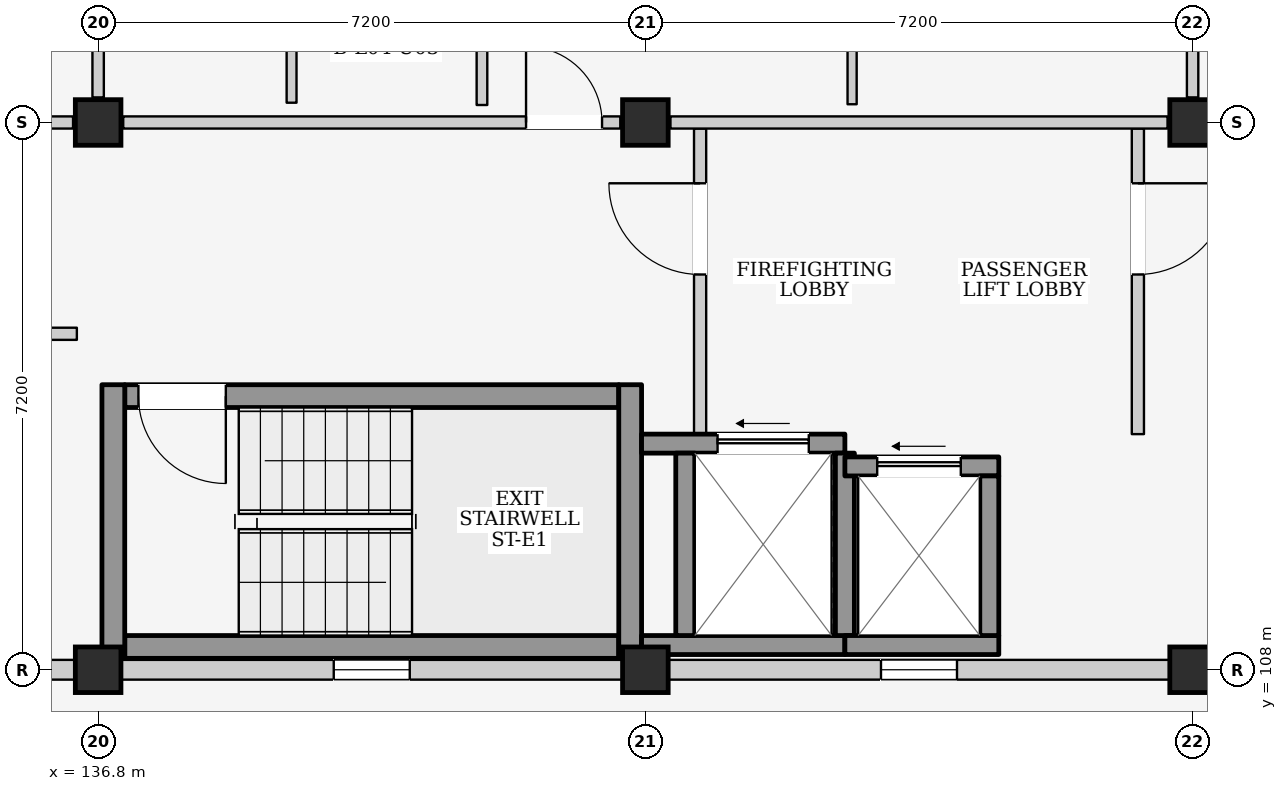
"""IFC4 building model, lengths in metres.
Left out: names, types, materials, properties, quantities, classifications, styles, units other than length and angle.
Written with IfcOpenShell. Run it as: python <this file> out.ifc"""

import sys

from ifc_helpers import new_model, si_unit, direction, frame, frame_2d, origin, origin_2d, place, context, subcontext, project, spatial, rectangle, extrude, element, fill, save


model = new_model("IFC4")
c1 = context("Model", 3, precision=1e-05, world=origin(), true_north=direction((0.0, 1.0)))
c2 = subcontext(c1, "Body", "Model", "MODEL_VIEW")
j1 = project(units=[si_unit("LENGTHUNIT", "METRE"), si_unit("PLANEANGLEUNIT", "RADIAN")], contexts=[c1])
p1 = place(None, origin())
s1 = spatial("IfcSite", under=j1, at=p1, CompositionType="ELEMENT")
p2 = place(p1, origin())
s2 = spatial("IfcBuilding", under=s1, at=p2, CompositionType="ELEMENT")
p3 = place(p2, frame((0.0, 0.0, 15.4)))
s3 = spatial("IfcBuildingStorey", under=s2, at=p3, CompositionType="ELEMENT", Elevation=15.4)
for number, where, z_axis, x_axis in (
    (1, (136.8, 108.0, 0.0), (0.0, 0.0, 1.0), (1.0, 0.0, 0.0)),
    (2, (136.8, 115.2, 0.0), (0.0, 0.0, 1.0), (1.0, 0.0, 0.0)),
    (3, (144.0, 108.0, 0.0), (0.0, 0.0, 1.0), (1.0, 0.0, 0.0)),
    (4, (144.0, 115.2, 0.0), (0.0, 0.0, 1.0), (1.0, 0.0, 0.0)),
    (5, (151.2, 108.0, 0.0), (0.0, 0.0, 1.0), (1.0, 0.0, 0.0)),
    (6, (151.2, 115.2, 0.0), (0.0, 0.0, 1.0), (1.0, 0.0, 0.0)),
):
    element("IfcColumn", number, at=place(p3, frame(where, z_axis=z_axis, x_axis=x_axis)), inside=s3, PredefinedType="COLUMN", context=c2, shape_type="SweptSolid", body=[
        extrude(rectangle(XDim=0.6, YDim=0.6, at=origin_2d()), origin(), (0.0, 0.0, 1.0), 3.2),
    ])
p4 = place(p3, frame((129.9, 108.0, 0.0), z_axis=(0.0, 0.0, 1.0), x_axis=(1.0, 0.0, 0.0)))
e7 = element("IfcWall", 7, at=p4, inside=s3, PredefinedType="ELEMENTEDWALL", context=c2, shape_type="SweptSolid", body=[
    extrude(rectangle(XDim=6.6, YDim=0.26, at=frame_2d((3.3, 0.0))), origin(), (0.0, 0.0, 1.0), 2.335),
])
p5 = place(p4, frame((1.1, 0.0, 0.0)))
e8 = element("IfcOpeningElement", 8, at=p5, cuts=e7, PredefinedType="OPENING", context=c2, shape_type="SweptSolid", body=[
    extrude(rectangle(XDim=1.5, YDim=2.12, at=frame_2d((0.75, 1.06))), frame((0.0, 0.145, 0.0), z_axis=(0.0, -1.0, 0.0), x_axis=(1.0, 0.0, 0.0)), (0.0, 0.0, 1.0), 0.29),
])
p6 = place(p4, frame((3.6, 0.0, 0.725)))
e9 = element("IfcOpeningElement", 9, at=p6, cuts=e7, PredefinedType="OPENING", context=c2, shape_type="SweptSolid", body=[
    extrude(rectangle(XDim=1.35, YDim=1.5, at=frame_2d((0.675, 0.75))), frame((0.0, 0.145, 0.0), z_axis=(0.0, -1.0, 0.0), x_axis=(1.0, 0.0, 0.0)), (0.0, 0.0, 1.0), 0.29),
])
p7 = place(p3, frame((137.1, 108.0, 0.0), z_axis=(0.0, 0.0, 1.0), x_axis=(1.0, 0.0, 0.0)))
e10 = element("IfcWall", 10, at=p7, inside=s3, PredefinedType="ELEMENTEDWALL", context=c2, shape_type="SweptSolid", body=[
    extrude(rectangle(XDim=6.6, YDim=0.26, at=frame_2d((3.3, 0.0))), origin(), (0.0, 0.0, 1.0), 2.335),
])
p8 = place(p7, frame((2.8, 0.0, 1.2)))
e11 = element("IfcOpeningElement", 11, at=p8, cuts=e10, PredefinedType="OPENING", context=c2, shape_type="SweptSolid", body=[
    extrude(rectangle(XDim=1.0, YDim=0.9, at=frame_2d((0.5, 0.45))), frame((0.0, 0.145, 0.0), z_axis=(0.0, -1.0, 0.0), x_axis=(1.0, 0.0, 0.0)), (0.0, 0.0, 1.0), 0.29),
])
p9 = place(p3, frame((144.3, 108.0, 0.0), z_axis=(0.0, 0.0, 1.0), x_axis=(1.0, 0.0, 0.0)))
e12 = element("IfcWall", 12, at=p9, inside=s3, PredefinedType="ELEMENTEDWALL", context=c2, shape_type="SweptSolid", body=[
    extrude(rectangle(XDim=6.6, YDim=0.26, at=frame_2d((3.3, 0.0))), origin(), (0.0, 0.0, 1.0), 2.335),
])
p10 = place(p9, frame((2.8, 0.0, 1.2)))
e13 = element("IfcOpeningElement", 13, at=p10, cuts=e12, PredefinedType="OPENING", context=c2, shape_type="SweptSolid", body=[
    extrude(rectangle(XDim=1.0, YDim=0.9, at=frame_2d((0.5, 0.45))), frame((0.0, 0.145, 0.0), z_axis=(0.0, -1.0, 0.0), x_axis=(1.0, 0.0, 0.0)), (0.0, 0.0, 1.0), 0.29),
])
p11 = place(p3, frame((137.15, 108.3, 0.0), z_axis=(0.0, 0.0, 1.0), x_axis=(1.0, 0.0, 0.0)))
e14 = element("IfcWall", 14, at=p11, inside=s3, PredefinedType="SHEAR", context=c2, shape_type="SweptSolid", body=[
    extrude(rectangle(XDim=6.5, YDim=0.3, at=frame_2d((3.25, 0.0))), origin(), (0.0, 0.0, 1.0), 2.95),
])
p12 = place(p3, frame((137.15, 111.6, 0.0), z_axis=(0.0, 0.0, 1.0), x_axis=(1.0, 0.0, 0.0)))
e15 = element("IfcWall", 15, at=p12, inside=s3, PredefinedType="SHEAR", context=c2, shape_type="SweptSolid", body=[
    extrude(rectangle(XDim=6.5, YDim=0.3, at=frame_2d((3.25, 0.0))), origin(), (0.0, 0.0, 1.0), 2.95),
])
p13 = place(p12, frame((0.18, 0.0, 0.0)))
e16 = element("IfcOpeningElement", 16, at=p13, cuts=e15, PredefinedType="OPENING", context=c2, shape_type="SweptSolid", body=[
    extrude(rectangle(XDim=1.15, YDim=2.2, at=frame_2d((0.575, 1.1))), frame((0.0, 0.165, 0.0), z_axis=(0.0, -1.0, 0.0), x_axis=(1.0, 0.0, 0.0)), (0.0, 0.0, 1.0), 0.33),
])
for number, where, z_axis, x_axis in (
    (17, (137.0, 108.15, 0.0), (0.0, 0.0, 1.0), (0.0, 1.0, 0.0)),
    (18, (143.8, 108.15, 0.0), (0.0, 0.0, 1.0), (0.0, 1.0, 0.0)),
):
    element("IfcWall", number, at=place(p3, frame(where, z_axis=z_axis, x_axis=x_axis)), inside=s3, PredefinedType="SHEAR", context=c2, shape_type="SweptSolid", body=[
        extrude(rectangle(XDim=3.6, YDim=0.3, at=frame_2d((1.8, 0.0))), origin(), (0.0, 0.0, 1.0), 2.95),
    ])
p14 = place(p3, frame((144.72, 111.1, 0.0), z_axis=(0.0, 0.0, 1.0), x_axis=(0.0, 1.0, 0.0)))
e19 = element("IfcWall", 19, at=p14, inside=s3, PredefinedType="PARTITIONING", context=c2, shape_type="SweptSolid", body=[
    extrude(rectangle(XDim=4.02, YDim=0.16, at=frame_2d((2.01, 0.0))), origin(), (0.0, 0.0, 1.0), 2.95),
])
p15 = place(p14, frame((2.1, 0.0, 0.0)))
e20 = element("IfcOpeningElement", 20, at=p15, cuts=e19, PredefinedType="OPENING", context=c2, shape_type="SweptSolid", body=[
    extrude(rectangle(XDim=1.2, YDim=2.2, at=frame_2d((0.6, 1.1))), frame((0.0, 0.095, 0.0), z_axis=(0.0, -1.0, 0.0), x_axis=(1.0, 0.0, 0.0)), (0.0, 0.0, 1.0), 0.19),
])
p16 = place(p3, frame((150.48, 111.1, 0.0), z_axis=(0.0, 0.0, 1.0), x_axis=(0.0, 1.0, 0.0)))
e21 = element("IfcWall", 21, at=p16, inside=s3, PredefinedType="PARTITIONING", context=c2, shape_type="SweptSolid", body=[
    extrude(rectangle(XDim=4.02, YDim=0.16, at=frame_2d((2.01, 0.0))), origin(), (0.0, 0.0, 1.0), 2.95),
])
p17 = place(p16, frame((2.1, 0.0, 0.0)))
e22 = element("IfcOpeningElement", 22, at=p17, cuts=e21, PredefinedType="OPENING", context=c2, shape_type="SweptSolid", body=[
    extrude(rectangle(XDim=1.2, YDim=2.2, at=frame_2d((0.6, 1.1))), frame((0.0, 0.095, 0.0), z_axis=(0.0, -1.0, 0.0), x_axis=(1.0, 0.0, 0.0)), (0.0, 0.0, 1.0), 0.19),
])
p18 = place(p3, frame((143.95, 108.325, 0.0), z_axis=(0.0, 0.0, 1.0), x_axis=(1.0, 0.0, 0.0)))
e23 = element("IfcWall", 23, at=p18, inside=s3, PredefinedType="SHEAR", context=c2, shape_type="SweptSolid", body=[
    extrude(rectangle(XDim=2.675, YDim=0.25, at=frame_2d((1.337, 0.0))), origin(), (0.0, 0.0, 1.0), 2.95),
])
p19 = place(p3, frame((143.95, 110.975, 0.0), z_axis=(0.0, 0.0, 1.0), x_axis=(1.0, 0.0, 0.0)))
e24 = element("IfcWall", 24, at=p19, inside=s3, PredefinedType="SHEAR", context=c2, shape_type="SweptSolid", body=[
    extrude(rectangle(XDim=2.675, YDim=0.25, at=frame_2d((1.337, 0.0))), origin(), (0.0, 0.0, 1.0), 2.95),
])
p20 = place(p19, frame((1.0, 0.0, 0.0)))
e25 = element("IfcOpeningElement", 25, at=p20, cuts=e24, PredefinedType="OPENING", context=c2, shape_type="SweptSolid", body=[
    extrude(rectangle(XDim=1.2, YDim=2.25, at=frame_2d((0.6, 1.125))), frame((0.0, 0.14, 0.0), z_axis=(0.0, -1.0, 0.0), x_axis=(1.0, 0.0, 0.0)), (0.0, 0.0, 1.0), 0.28),
])
for number, where, z_axis, x_axis in (
    (26, (144.525, 108.45, 0.0), (0.0, 0.0, 1.0), (0.0, 1.0, 0.0)),
    (27, (146.625, 108.45, 0.0), (0.0, 0.0, 1.0), (0.0, 1.0, 0.0)),
):
    element("IfcWall", number, at=place(p3, frame(where, z_axis=z_axis, x_axis=x_axis)), inside=s3, PredefinedType="SHEAR", context=c2, shape_type="SweptSolid", body=[
        extrude(rectangle(XDim=2.4, YDim=0.25, at=frame_2d((1.2, 0.0))), origin(), (0.0, 0.0, 1.0), 2.95),
    ])
p21 = place(p3, frame((146.625, 108.325, 0.0), z_axis=(0.0, 0.0, 1.0), x_axis=(1.0, 0.0, 0.0)))
e28 = element("IfcWall", 28, at=p21, inside=s3, PredefinedType="SHEAR", context=c2, shape_type="SweptSolid", body=[
    extrude(rectangle(XDim=2.025, YDim=0.25, at=frame_2d((1.012, 0.0))), origin(), (0.0, 0.0, 1.0), 2.95),
])
p22 = place(p3, frame((146.625, 110.675, 0.0), z_axis=(0.0, 0.0, 1.0), x_axis=(1.0, 0.0, 0.0)))
e29 = element("IfcWall", 29, at=p22, inside=s3, PredefinedType="SHEAR", context=c2, shape_type="SweptSolid", body=[
    extrude(rectangle(XDim=2.025, YDim=0.25, at=frame_2d((1.012, 0.0))), origin(), (0.0, 0.0, 1.0), 2.95),
])
p23 = place(p22, frame((0.425, 0.0, 0.0)))
e30 = element("IfcOpeningElement", 30, at=p23, cuts=e29, PredefinedType="OPENING", context=c2, shape_type="SweptSolid", body=[
    extrude(rectangle(XDim=1.1, YDim=2.15, at=frame_2d((0.55, 1.075))), frame((0.0, 0.14, 0.0), z_axis=(0.0, -1.0, 0.0), x_axis=(1.0, 0.0, 0.0)), (0.0, 0.0, 1.0), 0.28),
])
p24 = place(p3, frame((148.525, 108.45, 0.0), z_axis=(0.0, 0.0, 1.0), x_axis=(0.0, 1.0, 0.0)))
e31 = element("IfcWall", 31, at=p24, inside=s3, PredefinedType="SHEAR", context=c2, shape_type="SweptSolid", body=[
    extrude(rectangle(XDim=2.1, YDim=0.25, at=frame_2d((1.05, 0.0))), origin(), (0.0, 0.0, 1.0), 2.95),
])
p25 = place(p3, frame((129.93, 115.2, 0.0), z_axis=(0.0, 0.0, 1.0), x_axis=(1.0, 0.0, 0.0)))
e32 = element("IfcWall", 32, at=p25, inside=s3, PredefinedType="PARTITIONING", context=c2, shape_type="SweptSolid", body=[
    extrude(rectangle(XDim=6.54, YDim=0.16, at=frame_2d((3.27, 0.0))), origin(), (0.0, 0.0, 1.0), 2.335),
])
p26 = place(p25, frame((4.12, 0.0, 0.0)))
e33 = element("IfcOpeningElement", 33, at=p26, cuts=e32, PredefinedType="OPENING", context=c2, shape_type="SweptSolid", body=[
    extrude(rectangle(XDim=1.0, YDim=2.15, at=frame_2d((0.5, 1.075))), frame((0.0, 0.095, 0.0), z_axis=(0.0, -1.0, 0.0), x_axis=(1.0, 0.0, 0.0)), (0.0, 0.0, 1.0), 0.19),
])
p27 = place(p3, frame((136.8, 115.53, 0.0), z_axis=(0.0, 0.0, 1.0), x_axis=(0.0, 1.0, 0.0)))
e34 = element("IfcWall", 34, at=p27, inside=s3, PredefinedType="PARTITIONING", context=c2, shape_type="SweptSolid", body=[
    extrude(rectangle(XDim=6.54, YDim=0.15, at=frame_2d((3.27, 0.0))), origin(), (0.0, 0.0, 1.0), 2.385),
])
p28 = place(p3, frame((137.13, 115.2, 0.0), z_axis=(0.0, 0.0, 1.0), x_axis=(1.0, 0.0, 0.0)))
e35 = element("IfcWall", 35, at=p28, inside=s3, PredefinedType="PARTITIONING", context=c2, shape_type="SweptSolid", body=[
    extrude(rectangle(XDim=6.54, YDim=0.16, at=frame_2d((3.27, 0.0))), origin(), (0.0, 0.0, 1.0), 2.335),
])
p29 = place(p28, frame((5.3, 0.0, 0.0)))
e36 = element("IfcOpeningElement", 36, at=p29, cuts=e35, PredefinedType="OPENING", context=c2, shape_type="SweptSolid", body=[
    extrude(rectangle(XDim=1.0, YDim=2.15, at=frame_2d((0.5, 1.075))), frame((0.0, 0.095, 0.0), z_axis=(0.0, -1.0, 0.0), x_axis=(1.0, 0.0, 0.0)), (0.0, 0.0, 1.0), 0.19),
])
p30 = place(p3, frame((144.33, 115.2, 0.0), z_axis=(0.0, 0.0, 1.0), x_axis=(1.0, 0.0, 0.0)))
e37 = element("IfcWall", 37, at=p30, inside=s3, PredefinedType="PARTITIONING", context=c2, shape_type="SweptSolid", body=[
    extrude(rectangle(XDim=6.54, YDim=0.16, at=frame_2d((3.27, 0.0))), origin(), (0.0, 0.0, 1.0), 2.335),
])
p31 = place(p3, frame((151.2, 115.53, 0.0), z_axis=(0.0, 0.0, 1.0), x_axis=(0.0, 1.0, 0.0)))
e38 = element("IfcWall", 38, at=p31, inside=s3, PredefinedType="PARTITIONING", context=c2, shape_type="SweptSolid", body=[
    extrude(rectangle(XDim=6.54, YDim=0.15, at=frame_2d((3.27, 0.0))), origin(), (0.0, 0.0, 1.0), 2.385),
])
p32 = place(p3, frame((139.345, 115.46, 0.0), z_axis=(0.0, 0.0, 1.0), x_axis=(0.0, 1.0, 0.0)))
e39 = element("IfcWall", 39, at=p32, inside=s3, PredefinedType="PARTITIONING", context=c2, shape_type="SweptSolid", body=[
    extrude(rectangle(XDim=3.04, YDim=0.13, at=frame_2d((1.52, 0.0))), origin(), (0.0, 0.0, 1.0), 2.95),
])
p33 = place(p3, frame((141.85, 115.43, 0.0), z_axis=(0.0, 0.0, 1.0), x_axis=(0.0, 1.0, 0.0)))
e40 = element("IfcWall", 40, at=p33, inside=s3, PredefinedType="PARTITIONING", context=c2, shape_type="SweptSolid", body=[
    extrude(rectangle(XDim=3.06, YDim=0.14, at=frame_2d((1.53, 0.0))), origin(), (0.0, 0.0, 1.0), 2.95),
])
p34 = place(p3, frame((146.72, 115.44, 0.0), z_axis=(0.0, 0.0, 1.0), x_axis=(0.0, 1.0, 0.0)))
e41 = element("IfcWall", 41, at=p34, inside=s3, PredefinedType="PARTITIONING", context=c2, shape_type="SweptSolid", body=[
    extrude(rectangle(XDim=3.04, YDim=0.12, at=frame_2d((1.52, 0.0))), origin(), (0.0, 0.0, 1.0), 2.95),
])
p35 = place(p34, frame((1.04, 0.0, 0.0)))
e42 = element("IfcOpeningElement", 42, at=p35, cuts=e41, PredefinedType="OPENING", context=c2, shape_type="SweptSolid", body=[
    extrude(rectangle(XDim=0.96, YDim=2.15, at=frame_2d((0.48, 1.075))), frame((0.0, 0.075, 0.0), z_axis=(0.0, -1.0, 0.0), x_axis=(1.0, 0.0, 0.0)), (0.0, 0.0, 1.0), 0.15),
])
p36 = place(p3, frame((129.88, 112.42, 0.0), z_axis=(0.0, 0.0, 1.0), x_axis=(1.0, 0.0, 0.0)))
e43 = element("IfcWall", 43, at=p36, inside=s3, PredefinedType="PARTITIONING", context=c2, shape_type="SweptSolid", body=[
    extrude(rectangle(XDim=6.64, YDim=0.16, at=frame_2d((3.32, 0.0))), origin(), (0.0, 0.0, 1.0), 2.95),
])
p37 = place(p36, frame((2.78, 0.0, 0.0)))
e44 = element("IfcOpeningElement", 44, at=p37, cuts=e43, PredefinedType="OPENING", context=c2, shape_type="SweptSolid", body=[
    extrude(rectangle(XDim=1.08, YDim=2.22, at=frame_2d((0.54, 1.11))), frame((0.0, 0.095, 0.0), z_axis=(0.0, -1.0, 0.0), x_axis=(1.0, 0.0, 0.0)), (0.0, 0.0, 1.0), 0.19),
])
p38 = place(p8, origin())
e45 = element("IfcWindow", 45, at=p38, inside=s3, PartitioningType="SINGLE_PANEL", PredefinedType="WINDOW", context=c2, shape_type="SweptSolid", body=[
    extrude(rectangle(XDim=1.0, YDim=0.9, at=frame_2d((0.5, 0.45))), frame((0.0, 0.03, 0.0), z_axis=(0.0, -1.0, 0.0), x_axis=(1.0, 0.0, 0.0)), (0.0, 0.0, 1.0), 0.06),
])
fill(e11, e45)
p39 = place(p10, origin())
e46 = element("IfcWindow", 46, at=p39, inside=s3, PartitioningType="SINGLE_PANEL", PredefinedType="WINDOW", context=c2, shape_type="SweptSolid", body=[
    extrude(rectangle(XDim=1.0, YDim=0.9, at=frame_2d((0.5, 0.45))), frame((0.0, 0.03, 0.0), z_axis=(0.0, -1.0, 0.0), x_axis=(1.0, 0.0, 0.0)), (0.0, 0.0, 1.0), 0.06),
])
fill(e13, e46)
p40 = place(p13, frame((1.15, 0.0, 0.0), z_axis=(0.0, 0.0, 1.0), x_axis=(-1.0, 0.0, 0.0)))
e47 = element("IfcDoor", 47, at=p40, inside=s3, OperationType="SINGLE_SWING_LEFT", PredefinedType="DOOR", context=c2, shape_type="SweptSolid", body=[
    extrude(rectangle(XDim=1.15, YDim=2.2, at=frame_2d((0.575, 1.1))), frame((0.0, 0.025, 0.0), z_axis=(0.0, -1.0, 0.0), x_axis=(1.0, 0.0, 0.0)), (0.0, 0.0, 1.0), 0.05),
])
fill(e16, e47)
p41 = place(p15, origin())
e48 = element("IfcDoor", 48, at=p41, inside=s3, OperationType="SINGLE_SWING_RIGHT", PredefinedType="DOOR", context=c2, shape_type="SweptSolid", body=[
    extrude(rectangle(XDim=1.2, YDim=2.2, at=frame_2d((0.6, 1.1))), frame((0.0, 0.025, 0.0), z_axis=(0.0, -1.0, 0.0), x_axis=(1.0, 0.0, 0.0)), (0.0, 0.0, 1.0), 0.05),
])
fill(e20, e48)
p42 = place(p17, frame((1.2, 0.0, 0.0), z_axis=(0.0, 0.0, 1.0), x_axis=(-1.0, 0.0, 0.0)))
e49 = element("IfcDoor", 49, at=p42, inside=s3, OperationType="SINGLE_SWING_LEFT", PredefinedType="DOOR", context=c2, shape_type="SweptSolid", body=[
    extrude(rectangle(XDim=1.2, YDim=2.2, at=frame_2d((0.6, 1.1))), frame((0.0, 0.025, 0.0), z_axis=(0.0, -1.0, 0.0), x_axis=(1.0, 0.0, 0.0)), (0.0, 0.0, 1.0), 0.05),
])
fill(e22, e49)
p43 = place(p20, origin())
e50 = element("IfcDoor", 50, at=p43, inside=s3, OperationType="SLIDING_TO_LEFT", PredefinedType="DOOR", context=c2, shape_type="SweptSolid", body=[
    extrude(rectangle(XDim=1.2, YDim=2.25, at=frame_2d((0.6, 1.125))), frame((0.0, 0.025, 0.0), z_axis=(0.0, -1.0, 0.0), x_axis=(1.0, 0.0, 0.0)), (0.0, 0.0, 1.0), 0.05),
])
fill(e25, e50)
p44 = place(p23, origin())
e51 = element("IfcDoor", 51, at=p44, inside=s3, OperationType="SLIDING_TO_LEFT", PredefinedType="DOOR", context=c2, shape_type="SweptSolid", body=[
    extrude(rectangle(XDim=1.1, YDim=2.15, at=frame_2d((0.55, 1.075))), frame((0.0, 0.025, 0.0), z_axis=(0.0, -1.0, 0.0), x_axis=(1.0, 0.0, 0.0)), (0.0, 0.0, 1.0), 0.05),
])
fill(e30, e51)
p45 = place(p29, origin())
e52 = element("IfcDoor", 52, at=p45, inside=s3, OperationType="SINGLE_SWING_LEFT", PredefinedType="DOOR", context=c2, shape_type="SweptSolid", body=[
    extrude(rectangle(XDim=1.0, YDim=2.15, at=frame_2d((0.5, 1.075))), frame((0.0, 0.025, 0.0), z_axis=(0.0, -1.0, 0.0), x_axis=(1.0, 0.0, 0.0)), (0.0, 0.0, 1.0), 0.05),
])
fill(e36, e52)
save(model, sys.argv[1])
